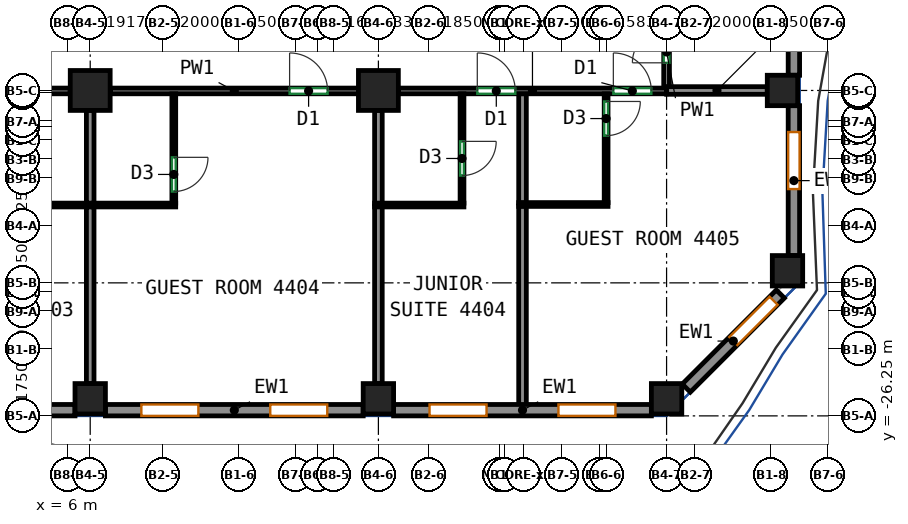
"""IFC4 building model, lengths in metres.
Left out: names, types, materials, properties, quantities, classifications, styles, units other than length and angle.
Written with IfcOpenShell. Run it as: python <this file> out.ifc"""

import sys

from ifc_helpers import new_model, si_unit, direction, frame, frame_2d, origin, origin_2d, place, context, subcontext, project, spatial, rectangle, extrude, source, transform, mapped, element, fill, save


model = new_model("IFC4")
c1 = context("Model", 3, precision=1e-05, world=origin(), true_north=direction((0.0, 1.0)))
c2 = subcontext(c1, "Body", "Model", "MODEL_VIEW")
j1 = project(units=[si_unit("LENGTHUNIT", "METRE"), si_unit("PLANEANGLEUNIT", "RADIAN")], contexts=[c1])
p1 = place(None, origin())
s1 = spatial("IfcSite", under=j1, at=p1, CompositionType="ELEMENT")
p2 = place(p1, origin())
s2 = spatial("IfcBuilding", under=s1, at=p2, CompositionType="ELEMENT")
p3 = place(p2, frame((0.0, 0.0, 185.5)))
s3 = spatial("IfcBuildingStorey", under=s2, at=p3, CompositionType="ELEMENT", Elevation=185.5)
m1 = source(origin(), c2, "Body", "SweptSolid", [
    extrude(rectangle(XDim=0.8, YDim=0.8, at=origin_2d()), origin(), (0.0, 0.0, 1.0), 3.12),
])
p4 = place(p3, frame((6.583, -25.8, 0.0), z_axis=(0.0, 0.0, 1.0), x_axis=(1.0, 0.0, 0.0)))
e1 = element("IfcColumn", 1, at=p4, inside=s3, PredefinedType="COLUMN", context=c2, shape_type="MappedRepresentation", body=[
    mapped(m1, transform((0.0, 0.0, 0.0))),
])
m2 = source(origin(), c2, "Body", "SweptSolid", [
    extrude(rectangle(XDim=1.05, YDim=1.05, at=origin_2d()), origin(), (0.0, 0.0, 1.0), 3.12),
])
p5 = place(p3, frame((6.583, -17.688, 0.0), z_axis=(0.0, 0.0, 1.0), x_axis=(1.0, 0.0, 0.0)))
e2 = element("IfcColumn", 2, at=p5, inside=s3, PredefinedType="COLUMN", context=c2, shape_type="MappedRepresentation", body=[
    mapped(m2, transform((0.0, 0.0, 0.0))),
])
p6 = place(p3, frame((14.167, -25.8, 0.0), z_axis=(0.0, 0.0, 1.0), x_axis=(1.0, 0.0, 0.0)))
e3 = element("IfcColumn", 3, at=p6, inside=s3, PredefinedType="COLUMN", context=c2, shape_type="MappedRepresentation", body=[
    mapped(m1, transform((0.0, 0.0, 0.0))),
])
p7 = place(p3, frame((14.167, -17.688, 0.0), z_axis=(0.0, 0.0, 1.0), x_axis=(1.0, 0.0, 0.0)))
e4 = element("IfcColumn", 4, at=p7, inside=s3, PredefinedType="COLUMN", context=c2, shape_type="MappedRepresentation", body=[
    mapped(m2, transform((0.0, 0.0, 0.0))),
])
for number, where, z_axis, x_axis in (
    (5, (21.75, -25.8, 0.0), (0.0, 0.0, 1.0), (1.0, 0.0, 0.0)),
    (6, (24.8, -17.688, 0.0), (0.0, 0.0, 1.0), (1.0, 0.0, 0.0)),
    (7, (24.932, -22.432, 0.0), (0.0, 0.0, 1.0), (1.0, 0.0, 0.0)),
):
    element("IfcColumn", number, at=place(p3, frame(where, z_axis=z_axis, x_axis=x_axis)), inside=s3, PredefinedType="COLUMN", context=c2, shape_type="MappedRepresentation", body=[
        mapped(m1, transform((0.0, 0.0, 0.0))),
    ])
m3 = source(origin(), c2, "Body", "SweptSolid", [
    extrude(rectangle(XDim=6.783, YDim=0.3, at=frame_2d((3.392, 0.0))), origin(), (0.0, 0.0, 1.0), 3.12),
])
p8 = place(p3, frame((-0.6, -26.1, 0.0), z_axis=(0.0, 0.0, 1.0), x_axis=(1.0, 0.0, 0.0)))
e8 = element("IfcWall", 8, at=p8, inside=s3, PredefinedType="SOLIDWALL", context=c2, shape_type="MappedRepresentation", body=[
    mapped(m3, transform((0.0, 0.0, 0.0))),
])
p9 = place(p8, frame((0.946, 0.0, 0.85)))
e9 = element("IfcOpeningElement", 9, at=p9, cuts=e8, PredefinedType="OPENING", context=c2, shape_type="SweptSolid", body=[
    extrude(rectangle(XDim=1.5, YDim=1.95, at=frame_2d((0.75, 0.975))), frame((0.0, 0.16, 0.0), z_axis=(0.0, -1.0, 0.0), x_axis=(1.0, 0.0, 0.0)), (0.0, 0.0, 1.0), 0.32),
])
p10 = place(p8, frame((4.337, 0.0, 0.85)))
e10 = element("IfcOpeningElement", 10, at=p10, cuts=e8, PredefinedType="OPENING", context=c2, shape_type="SweptSolid", body=[
    extrude(rectangle(XDim=1.5, YDim=1.95, at=frame_2d((0.75, 0.975))), frame((0.0, 0.16, 0.0), z_axis=(0.0, -1.0, 0.0), x_axis=(1.0, 0.0, 0.0)), (0.0, 0.0, 1.0), 0.32),
])
m4 = source(origin(), c2, "Body", "SweptSolid", [
    extrude(rectangle(XDim=6.783, YDim=0.3, at=frame_2d((3.392, 0.0))), origin(), (0.0, 0.0, 1.0), 3.12),
])
p11 = place(p3, frame((6.983, -26.1, 0.0), z_axis=(0.0, 0.0, 1.0), x_axis=(1.0, 0.0, 0.0)))
e11 = element("IfcWall", 11, at=p11, inside=s3, PredefinedType="SOLIDWALL", context=c2, shape_type="MappedRepresentation", body=[
    mapped(m4, transform((0.0, 0.0, 0.0))),
])
p12 = place(p11, frame((0.946, 0.0, 0.85)))
e12 = element("IfcOpeningElement", 12, at=p12, cuts=e11, PredefinedType="OPENING", context=c2, shape_type="SweptSolid", body=[
    extrude(rectangle(XDim=1.5, YDim=1.95, at=frame_2d((0.75, 0.975))), frame((0.0, 0.16, 0.0), z_axis=(0.0, -1.0, 0.0), x_axis=(1.0, 0.0, 0.0)), (0.0, 0.0, 1.0), 0.32),
])
p13 = place(p11, frame((4.338, 0.0, 0.85)))
e13 = element("IfcOpeningElement", 13, at=p13, cuts=e11, PredefinedType="OPENING", context=c2, shape_type="SweptSolid", body=[
    extrude(rectangle(XDim=1.5, YDim=1.95, at=frame_2d((0.75, 0.975))), frame((0.0, 0.16, 0.0), z_axis=(0.0, -1.0, 0.0), x_axis=(1.0, 0.0, 0.0)), (0.0, 0.0, 1.0), 0.32),
])
p14 = place(p3, frame((14.567, -26.1, 0.0), z_axis=(0.0, 0.0, 1.0), x_axis=(1.0, 0.0, 0.0)))
e14 = element("IfcWall", 14, at=p14, inside=s3, PredefinedType="SOLIDWALL", context=c2, shape_type="MappedRepresentation", body=[
    mapped(m3, transform((0.0, 0.0, 0.0))),
])
p15 = place(p14, frame((0.946, 0.0, 0.85)))
e15 = element("IfcOpeningElement", 15, at=p15, cuts=e14, PredefinedType="OPENING", context=c2, shape_type="SweptSolid", body=[
    extrude(rectangle(XDim=1.5, YDim=1.95, at=frame_2d((0.75, 0.975))), frame((0.0, 0.16, 0.0), z_axis=(0.0, -1.0, 0.0), x_axis=(1.0, 0.0, 0.0)), (0.0, 0.0, 1.0), 0.32),
])
p16 = place(p14, frame((4.337, 0.0, 0.85)))
e16 = element("IfcOpeningElement", 16, at=p16, cuts=e14, PredefinedType="OPENING", context=c2, shape_type="SweptSolid", body=[
    extrude(rectangle(XDim=1.5, YDim=1.95, at=frame_2d((0.75, 0.975))), frame((0.0, 0.16, 0.0), z_axis=(0.0, -1.0, 0.0), x_axis=(1.0, 0.0, 0.0)), (0.0, 0.0, 1.0), 0.32),
])
m5 = source(origin(), c2, "Body", "SweptSolid", [
    extrude(rectangle(XDim=3.5, YDim=0.3, at=frame_2d((1.75, 0.0))), origin(), (0.0, 0.0, 1.0), 3.12),
])
p17 = place(p3, frame((22.269, -25.519, 0.0), z_axis=(0.0, 0.0, 1.0), x_axis=(0.707141656123, 0.70707190453, 0.0)))
e17 = element("IfcWall", 17, at=p17, inside=s3, PredefinedType="SOLIDWALL", context=c2, shape_type="MappedRepresentation", body=[
    mapped(m5, transform((0.0, 0.0, 0.0))),
])
p18 = place(p17, frame((1.75, 0.0, 0.85)))
e18 = element("IfcOpeningElement", 18, at=p18, cuts=e17, PredefinedType="OPENING", context=c2, shape_type="SweptSolid", body=[
    extrude(rectangle(XDim=1.5, YDim=1.95, at=frame_2d((0.75, 0.975))), frame((0.0, 0.16, 0.0), z_axis=(0.0, -1.0, 0.0), x_axis=(1.0, 0.0, 0.0)), (0.0, 0.0, 1.0), 0.32),
])
m6 = source(origin(), c2, "Body", "SweptSolid", [
    extrude(rectangle(XDim=3.944, YDim=0.3, at=frame_2d((1.972, 0.0))), origin(), (0.0, 0.0, 1.0), 3.12),
])
p19 = place(p3, frame((25.1, -22.032, 0.0), z_axis=(0.0, 0.0, 1.0), x_axis=(0.0, 1.0, 0.0)))
e19 = element("IfcWall", 19, at=p19, inside=s3, PredefinedType="SOLIDWALL", context=c2, shape_type="MappedRepresentation", body=[
    mapped(m6, transform((0.0, 0.0, 0.0))),
])
p20 = place(p19, frame((1.75, 0.0, 0.85)))
e20 = element("IfcOpeningElement", 20, at=p20, cuts=e19, PredefinedType="OPENING", context=c2, shape_type="SweptSolid", body=[
    extrude(rectangle(XDim=1.5, YDim=1.95, at=frame_2d((0.75, 0.975))), frame((0.0, 0.16, 0.0), z_axis=(0.0, -1.0, 0.0), x_axis=(1.0, 0.0, 0.0)), (0.0, 0.0, 1.0), 0.32),
])
m7 = source(origin(), c2, "Body", "SweptSolid", [
    extrude(rectangle(XDim=7.763, YDim=0.3, at=frame_2d((3.881, 0.0))), origin(), (0.0, 0.0, 1.0), 3.12),
])
p21 = place(p3, frame((25.1, -17.288, 0.0), z_axis=(0.0, 0.0, 1.0), x_axis=(0.0, 1.0, 0.0)))
e21 = element("IfcWall", 21, at=p21, inside=s3, PredefinedType="SOLIDWALL", context=c2, shape_type="MappedRepresentation", body=[
    mapped(m7, transform((0.0, 0.0, 0.0))),
])
p22 = place(p21, frame((1.75, 0.0, 0.85)))
e22 = element("IfcOpeningElement", 22, at=p22, cuts=e21, PredefinedType="OPENING", context=c2, shape_type="SweptSolid", body=[
    extrude(rectangle(XDim=1.5, YDim=1.95, at=frame_2d((0.75, 0.975))), frame((0.0, 0.16, 0.0), z_axis=(0.0, -1.0, 0.0), x_axis=(1.0, 0.0, 0.0)), (0.0, 0.0, 1.0), 0.32),
])
p23 = place(p21, frame((5.631, 0.0, 0.85)))
e23 = element("IfcOpeningElement", 23, at=p23, cuts=e21, PredefinedType="OPENING", context=c2, shape_type="SweptSolid", body=[
    extrude(rectangle(XDim=1.5, YDim=1.95, at=frame_2d((0.75, 0.975))), frame((0.0, 0.16, 0.0), z_axis=(0.0, -1.0, 0.0), x_axis=(1.0, 0.0, 0.0)), (0.0, 0.0, 1.0), 0.32),
])
p24 = place(p21, frame((4.331, 0.0, 0.0)))
e24 = element("IfcOpeningElement", 24, at=p24, cuts=e21, PredefinedType="OPENING", context=c2, shape_type="SweptSolid", body=[
    extrude(rectangle(XDim=1.0, YDim=2.1, at=frame_2d((0.5, 1.05))), frame((0.0, 0.16, 0.0), z_axis=(0.0, -1.0, 0.0), x_axis=(1.0, 0.0, 0.0)), (0.0, 0.0, 1.0), 0.32),
])
p25 = place(p3, frame((-0.475, -17.7, 0.0), z_axis=(0.0, 0.0, 1.0), x_axis=(1.0, 0.0, 0.0)))
e25 = element("IfcWall", 25, at=p25, inside=s3, PredefinedType="PARTITIONING", context=c2, shape_type="SweptSolid", body=[
    extrude(rectangle(XDim=6.533, YDim=0.15, at=frame_2d((3.267, 0.0))), origin(), (0.0, 0.0, 1.0), 3.12),
])
p26 = place(p25, frame((1.926, 0.0, 0.0)))
e26 = element("IfcOpeningElement", 26, at=p26, cuts=e25, PredefinedType="OPENING", context=c2, shape_type="SweptSolid", body=[
    extrude(rectangle(XDim=1.0, YDim=2.1, at=frame_2d((0.5, 1.05))), frame((0.0, 0.085, 0.0), z_axis=(0.0, -1.0, 0.0), x_axis=(1.0, 0.0, 0.0)), (0.0, 0.0, 1.0), 0.17),
])
p27 = place(p25, frame((3.387, 0.0, 0.0)))
e27 = element("IfcOpeningElement", 27, at=p27, cuts=e25, PredefinedType="OPENING", context=c2, shape_type="SweptSolid", body=[
    extrude(rectangle(XDim=1.0, YDim=2.1, at=frame_2d((0.5, 1.05))), frame((0.0, 0.085, 0.0), z_axis=(0.0, -1.0, 0.0), x_axis=(1.0, 0.0, 0.0)), (0.0, 0.0, 1.0), 0.17),
])
p28 = place(p3, frame((7.108, -17.7, 0.0), z_axis=(0.0, 0.0, 1.0), x_axis=(1.0, 0.0, 0.0)))
e28 = element("IfcWall", 28, at=p28, inside=s3, PredefinedType="PARTITIONING", context=c2, shape_type="SweptSolid", body=[
    extrude(rectangle(XDim=6.534, YDim=0.15, at=frame_2d((3.267, 0.0))), origin(), (0.0, 0.0, 1.0), 3.12),
])
p29 = place(p28, frame((4.722, 0.0, 0.0)))
e29 = element("IfcOpeningElement", 29, at=p29, cuts=e28, PredefinedType="OPENING", context=c2, shape_type="SweptSolid", body=[
    extrude(rectangle(XDim=1.0, YDim=2.1, at=frame_2d((0.5, 1.05))), frame((0.0, 0.085, 0.0), z_axis=(0.0, -1.0, 0.0), x_axis=(1.0, 0.0, 0.0)), (0.0, 0.0, 1.0), 0.17),
])
p30 = place(p3, frame((14.692, -17.7, 0.0), z_axis=(0.0, 0.0, 1.0), x_axis=(1.0, 0.0, 0.0)))
e30 = element("IfcWall", 30, at=p30, inside=s3, PredefinedType="PARTITIONING", context=c2, shape_type="SweptSolid", body=[
    extrude(rectangle(XDim=7.058, YDim=0.15, at=frame_2d((3.529, 0.0))), origin(), (0.0, 0.0, 1.0), 2.52),
])
p31 = place(p30, frame((2.077, 0.0, 0.0)))
e31 = element("IfcOpeningElement", 31, at=p31, cuts=e30, PredefinedType="OPENING", context=c2, shape_type="SweptSolid", body=[
    extrude(rectangle(XDim=1.0, YDim=2.1, at=frame_2d((0.5, 1.05))), frame((0.0, 0.085, 0.0), z_axis=(0.0, -1.0, 0.0), x_axis=(1.0, 0.0, 0.0)), (0.0, 0.0, 1.0), 0.17),
])
p32 = place(p30, frame((5.657, 0.0, 0.0)))
e32 = element("IfcOpeningElement", 32, at=p32, cuts=e30, PredefinedType="OPENING", context=c2, shape_type="SweptSolid", body=[
    extrude(rectangle(XDim=1.0, YDim=2.1, at=frame_2d((0.5, 1.05))), frame((0.0, 0.085, 0.0), z_axis=(0.0, -1.0, 0.0), x_axis=(1.0, 0.0, 0.0)), (0.0, 0.0, 1.0), 0.17),
])
p33 = place(p3, frame((21.75, -17.598, 0.0), z_axis=(0.0, 0.0, 1.0), x_axis=(0.0, 1.0, 0.0)))
e33 = element("IfcWall", 33, at=p33, inside=s3, PredefinedType="PARTITIONING", context=c2, shape_type="SweptSolid", body=[
    extrude(rectangle(XDim=1.848, YDim=0.15, at=frame_2d((0.924, 0.0))), origin(), (0.0, 0.0, 1.0), 3.12),
])
p34 = place(p33, frame((0.638, 0.0, 0.0)))
e34 = element("IfcOpeningElement", 34, at=p34, cuts=e33, PredefinedType="OPENING", context=c2, shape_type="SweptSolid", body=[
    extrude(rectangle(XDim=0.9, YDim=2.1, at=frame_2d((0.45, 1.05))), frame((0.0, 0.085, 0.0), z_axis=(0.0, -1.0, 0.0), x_axis=(1.0, 0.0, 0.0)), (0.0, 0.0, 1.0), 0.17),
])
p35 = place(p3, frame((4.333, -20.702, 0.0), z_axis=(0.0, 0.0, 1.0), x_axis=(1.0, 0.0, 0.0)))
e35 = element("IfcWall", 35, at=p35, inside=s3, PredefinedType="PARTITIONING", context=c2, shape_type="SweptSolid", body=[
    extrude(rectangle(XDim=4.5, YDim=0.1, at=frame_2d((2.25, 0.0))), origin(), (0.0, 0.0, 1.0), 3.12),
])
p36 = place(p3, frame((6.583, -25.4, 0.0), z_axis=(0.0, 0.0, 1.0), x_axis=(0.0, 1.0, 0.0)))
e36 = element("IfcWall", 36, at=p36, inside=s3, PredefinedType="PARTITIONING", context=c2, shape_type="SweptSolid", body=[
    extrude(rectangle(XDim=4.648, YDim=0.2, at=frame_2d((2.324, 0.0))), origin(), (0.0, 0.0, 1.0), 3.12),
])
p37 = place(p3, frame((6.583, -20.652, 0.0), z_axis=(0.0, 0.0, 1.0), x_axis=(0.0, 1.0, 0.0)))
e37 = element("IfcWall", 37, at=p37, inside=s3, PredefinedType="PARTITIONING", context=c2, shape_type="SweptSolid", body=[
    extrude(rectangle(XDim=2.44, YDim=0.2, at=frame_2d((1.22, 0.0))), origin(), (0.0, 0.0, 1.0), 3.12),
])
p38 = place(p3, frame((8.783, -17.777, 0.0), z_axis=(0.0, 0.0, 1.0), x_axis=(0.0, -1.0, 0.0)))
e38 = element("IfcWall", 38, at=p38, inside=s3, PredefinedType="PARTITIONING", context=c2, shape_type="SweptSolid", body=[
    extrude(rectangle(XDim=2.875, YDim=0.1, at=frame_2d((1.438, 0.0))), origin(), (0.0, 0.0, 1.0), 3.12),
])
p39 = place(p38, frame((1.67, 0.0, 0.0)))
e39 = element("IfcOpeningElement", 39, at=p39, cuts=e38, PredefinedType="OPENING", context=c2, shape_type="SweptSolid", body=[
    extrude(rectangle(XDim=0.9, YDim=2.1, at=frame_2d((0.45, 1.05))), frame((0.0, 0.06, 0.0), z_axis=(0.0, -1.0, 0.0), x_axis=(1.0, 0.0, 0.0)), (0.0, 0.0, 1.0), 0.12),
])
p40 = place(p3, frame((14.167, -25.4, 0.0), z_axis=(0.0, 0.0, 1.0), x_axis=(0.0, 1.0, 0.0)))
e40 = element("IfcWall", 40, at=p40, inside=s3, PredefinedType="PARTITIONING", context=c2, shape_type="SweptSolid", body=[
    extrude(rectangle(XDim=4.658, YDim=0.2, at=frame_2d((2.329, 0.0))), origin(), (0.0, 0.0, 1.0), 3.12),
])
p41 = place(p3, frame((14.167, -20.662, 0.0), z_axis=(0.0, 0.0, 1.0), x_axis=(0.0, 1.0, 0.0)))
e41 = element("IfcWall", 41, at=p41, inside=s3, PredefinedType="PARTITIONING", context=c2, shape_type="SweptSolid", body=[
    extrude(rectangle(XDim=2.45, YDim=0.2, at=frame_2d((1.225, 0.0))), origin(), (0.0, 0.0, 1.0), 3.12),
])
p42 = place(p3, frame((16.367, -17.777, 0.0), z_axis=(0.0, 0.0, 1.0), x_axis=(0.0, -1.0, 0.0)))
e42 = element("IfcWall", 42, at=p42, inside=s3, PredefinedType="PARTITIONING", context=c2, shape_type="SweptSolid", body=[
    extrude(rectangle(XDim=2.875, YDim=0.1, at=frame_2d((1.438, 0.0))), origin(), (0.0, 0.0, 1.0), 3.12),
])
p43 = place(p42, frame((1.25, 0.0, 0.0)))
e43 = element("IfcOpeningElement", 43, at=p43, cuts=e42, PredefinedType="OPENING", context=c2, shape_type="SweptSolid", body=[
    extrude(rectangle(XDim=0.9, YDim=2.1, at=frame_2d((0.45, 1.05))), frame((0.0, 0.06, 0.0), z_axis=(0.0, -1.0, 0.0), x_axis=(1.0, 0.0, 0.0)), (0.0, 0.0, 1.0), 0.12),
])
p44 = place(p3, frame((14.067, -20.702, 0.0), z_axis=(0.0, 0.0, 1.0), x_axis=(1.0, 0.0, 0.0)))
e44 = element("IfcWall", 44, at=p44, inside=s3, PredefinedType="PARTITIONING", context=c2, shape_type="SweptSolid", body=[
    extrude(rectangle(XDim=2.35, YDim=0.1, at=frame_2d((1.175, 0.0))), origin(), (0.0, 0.0, 1.0), 3.12),
])
p45 = place(p3, frame((17.959, -26.0, 0.0), z_axis=(0.0, 0.0, 1.0), x_axis=(0.0, 1.0, 0.0)))
e45 = element("IfcWall", 45, at=p45, inside=s3, PredefinedType="PARTITIONING", context=c2, shape_type="SweptSolid", body=[
    extrude(rectangle(XDim=5.272, YDim=0.2, at=frame_2d((2.636, 0.0))), origin(), (0.0, 0.0, 1.0), 3.12),
])
p46 = place(p3, frame((17.959, -20.648, 0.0), z_axis=(0.0, 0.0, 1.0), x_axis=(0.0, 1.0, 0.0)))
e46 = element("IfcWall", 46, at=p46, inside=s3, PredefinedType="PARTITIONING", context=c2, shape_type="SweptSolid", body=[
    extrude(rectangle(XDim=2.871, YDim=0.2, at=frame_2d((1.436, 0.0))), origin(), (0.0, 0.0, 1.0), 3.12),
])
p47 = place(p3, frame((17.859, -20.688, 0.0), z_axis=(0.0, 0.0, 1.0), x_axis=(1.0, 0.0, 0.0)))
e47 = element("IfcWall", 47, at=p47, inside=s3, PredefinedType="PARTITIONING", context=c2, shape_type="SweptSolid", body=[
    extrude(rectangle(XDim=2.35, YDim=0.1, at=frame_2d((1.175, 0.0))), origin(), (0.0, 0.0, 1.0), 3.12),
])
p48 = place(p3, frame((20.159, -17.777, 0.0), z_axis=(0.0, 0.0, 1.0), x_axis=(0.0, -1.0, 0.0)))
e48 = element("IfcWall", 48, at=p48, inside=s3, PredefinedType="PARTITIONING", context=c2, shape_type="SweptSolid", body=[
    extrude(rectangle(XDim=2.861, YDim=0.1, at=frame_2d((1.43, 0.0))), origin(), (0.0, 0.0, 1.0), 3.12),
])
p49 = place(p48, frame((0.2, 0.0, 0.0)))
e49 = element("IfcOpeningElement", 49, at=p49, cuts=e48, PredefinedType="OPENING", context=c2, shape_type="SweptSolid", body=[
    extrude(rectangle(XDim=0.9, YDim=2.1, at=frame_2d((0.45, 1.05))), frame((0.0, 0.06, 0.0), z_axis=(0.0, -1.0, 0.0), x_axis=(1.0, 0.0, 0.0)), (0.0, 0.0, 1.0), 0.12),
])
p50 = place(p3, frame((21.752, -17.688, 0.0), z_axis=(0.0, 0.0, 1.0), x_axis=(1.0, 0.0, 0.0)))
e50 = element("IfcWall", 50, at=p50, inside=s3, PredefinedType="PARTITIONING", context=c2, shape_type="SweptSolid", body=[
    extrude(rectangle(XDim=2.648, YDim=0.2, at=frame_2d((1.324, 0.0))), origin(), (0.0, 0.0, 1.0), 2.52),
])
p51 = place(p12, origin())
e51 = element("IfcWindow", 51, at=p51, inside=s3, PartitioningType="SINGLE_PANEL", PredefinedType="WINDOW", context=c2, shape_type="SweptSolid", body=[
    extrude(rectangle(XDim=1.5, YDim=1.95, at=frame_2d((0.75, 0.975))), frame((0.0, 0.03, 0.0), z_axis=(0.0, -1.0, 0.0), x_axis=(1.0, 0.0, 0.0)), (0.0, 0.0, 1.0), 0.06),
])
fill(e12, e51)
p52 = place(p13, origin())
e52 = element("IfcWindow", 52, at=p52, inside=s3, PartitioningType="SINGLE_PANEL", PredefinedType="WINDOW", context=c2, shape_type="SweptSolid", body=[
    extrude(rectangle(XDim=1.5, YDim=1.95, at=frame_2d((0.75, 0.975))), frame((0.0, 0.03, 0.0), z_axis=(0.0, -1.0, 0.0), x_axis=(1.0, 0.0, 0.0)), (0.0, 0.0, 1.0), 0.06),
])
fill(e13, e52)
p53 = place(p15, origin())
e53 = element("IfcWindow", 53, at=p53, inside=s3, PartitioningType="SINGLE_PANEL", PredefinedType="WINDOW", context=c2, shape_type="SweptSolid", body=[
    extrude(rectangle(XDim=1.5, YDim=1.95, at=frame_2d((0.75, 0.975))), frame((0.0, 0.03, 0.0), z_axis=(0.0, -1.0, 0.0), x_axis=(1.0, 0.0, 0.0)), (0.0, 0.0, 1.0), 0.06),
])
fill(e15, e53)
p54 = place(p16, origin())
e54 = element("IfcWindow", 54, at=p54, inside=s3, PartitioningType="SINGLE_PANEL", PredefinedType="WINDOW", context=c2, shape_type="SweptSolid", body=[
    extrude(rectangle(XDim=1.5, YDim=1.95, at=frame_2d((0.75, 0.975))), frame((0.0, 0.03, 0.0), z_axis=(0.0, -1.0, 0.0), x_axis=(1.0, 0.0, 0.0)), (0.0, 0.0, 1.0), 0.06),
])
fill(e16, e54)
p55 = place(p18, origin())
e55 = element("IfcWindow", 55, at=p55, inside=s3, PartitioningType="SINGLE_PANEL", PredefinedType="WINDOW", context=c2, shape_type="SweptSolid", body=[
    extrude(rectangle(XDim=1.5, YDim=1.95, at=frame_2d((0.75, 0.975))), frame((0.0, 0.03, 0.0), z_axis=(0.0, -1.0, 0.0), x_axis=(1.0, 0.0, 0.0)), (0.0, 0.0, 1.0), 0.06),
])
fill(e18, e55)
p56 = place(p20, origin())
e56 = element("IfcWindow", 56, at=p56, inside=s3, PartitioningType="SINGLE_PANEL", PredefinedType="WINDOW", context=c2, shape_type="SweptSolid", body=[
    extrude(rectangle(XDim=1.5, YDim=1.95, at=frame_2d((0.75, 0.975))), frame((0.0, 0.03, 0.0), z_axis=(0.0, -1.0, 0.0), x_axis=(1.0, 0.0, 0.0)), (0.0, 0.0, 1.0), 0.06),
])
fill(e20, e56)
p57 = place(p39, origin())
e57 = element("IfcDoor", 57, at=p57, inside=s3, OperationType="SINGLE_SWING_LEFT", PredefinedType="DOOR", context=c2, shape_type="SweptSolid", body=[
    extrude(rectangle(XDim=0.9, YDim=2.1, at=frame_2d((0.45, 1.05))), frame((0.0, 0.025, 0.0), z_axis=(0.0, -1.0, 0.0), x_axis=(1.0, 0.0, 0.0)), (0.0, 0.0, 1.0), 0.05),
])
fill(e39, e57)
p58 = place(p43, origin())
e58 = element("IfcDoor", 58, at=p58, inside=s3, OperationType="SINGLE_SWING_LEFT", PredefinedType="DOOR", context=c2, shape_type="SweptSolid", body=[
    extrude(rectangle(XDim=0.9, YDim=2.1, at=frame_2d((0.45, 1.05))), frame((0.0, 0.025, 0.0), z_axis=(0.0, -1.0, 0.0), x_axis=(1.0, 0.0, 0.0)), (0.0, 0.0, 1.0), 0.05),
])
fill(e43, e58)
p59 = place(p49, origin())
e59 = element("IfcDoor", 59, at=p59, inside=s3, OperationType="SINGLE_SWING_LEFT", PredefinedType="DOOR", context=c2, shape_type="SweptSolid", body=[
    extrude(rectangle(XDim=0.9, YDim=2.1, at=frame_2d((0.45, 1.05))), frame((0.0, 0.025, 0.0), z_axis=(0.0, -1.0, 0.0), x_axis=(1.0, 0.0, 0.0)), (0.0, 0.0, 1.0), 0.05),
])
fill(e49, e59)
p60 = place(p29, origin())
e60 = element("IfcDoor", 60, at=p60, inside=s3, OperationType="SINGLE_SWING_LEFT", PredefinedType="DOOR", context=c2, shape_type="SweptSolid", body=[
    extrude(rectangle(XDim=1.0, YDim=2.1, at=frame_2d((0.5, 1.05))), frame((0.0, 0.025, 0.0), z_axis=(0.0, -1.0, 0.0), x_axis=(1.0, 0.0, 0.0)), (0.0, 0.0, 1.0), 0.05),
])
fill(e29, e60)
p61 = place(p31, origin())
e61 = element("IfcDoor", 61, at=p61, inside=s3, OperationType="SINGLE_SWING_LEFT", PredefinedType="DOOR", context=c2, shape_type="SweptSolid", body=[
    extrude(rectangle(XDim=1.0, YDim=2.1, at=frame_2d((0.5, 1.05))), frame((0.0, 0.025, 0.0), z_axis=(0.0, -1.0, 0.0), x_axis=(1.0, 0.0, 0.0)), (0.0, 0.0, 1.0), 0.05),
])
fill(e31, e61)
p62 = place(p32, origin())
e62 = element("IfcDoor", 62, at=p62, inside=s3, OperationType="SINGLE_SWING_LEFT", PredefinedType="DOOR", context=c2, shape_type="SweptSolid", body=[
    extrude(rectangle(XDim=1.0, YDim=2.1, at=frame_2d((0.5, 1.05))), frame((0.0, 0.025, 0.0), z_axis=(0.0, -1.0, 0.0), x_axis=(1.0, 0.0, 0.0)), (0.0, 0.0, 1.0), 0.05),
])
fill(e32, e62)
p63 = place(p34, origin())
e63 = element("IfcDoor", 63, at=p63, inside=s3, OperationType="SINGLE_SWING_LEFT", PredefinedType="DOOR", context=c2, shape_type="SweptSolid", body=[
    extrude(rectangle(XDim=0.9, YDim=2.1, at=frame_2d((0.45, 1.05))), frame((0.0, 0.025, 0.0), z_axis=(0.0, -1.0, 0.0), x_axis=(1.0, 0.0, 0.0)), (0.0, 0.0, 1.0), 0.05),
])
fill(e34, e63)
save(model, sys.argv[1])
